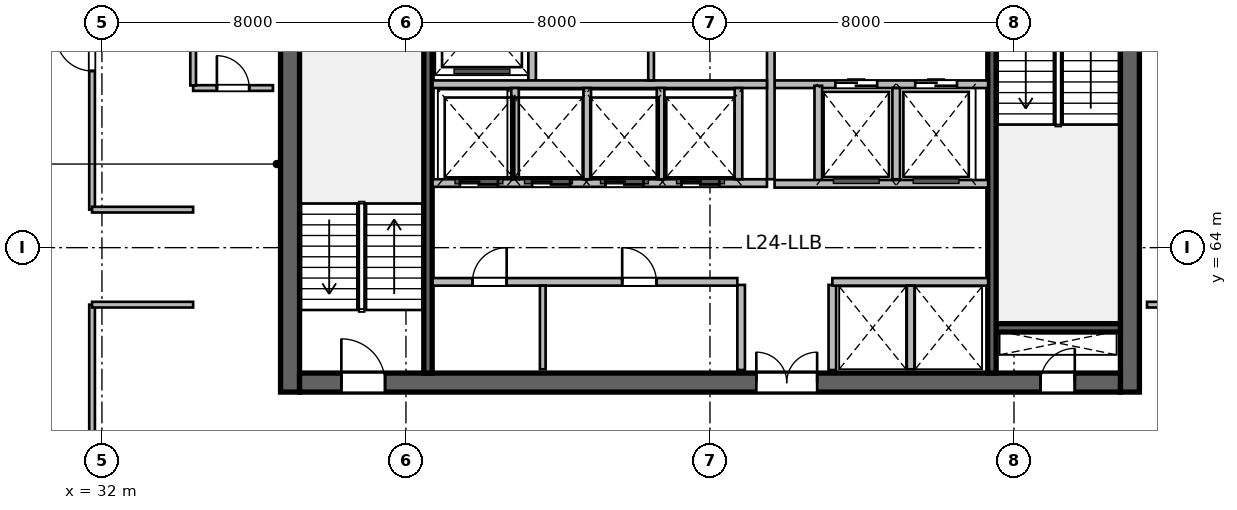
"""IFC4 building model, lengths in metres.
Left out: names, types, materials, properties, quantities, classifications, styles, units other than length and angle.
Written with IfcOpenShell. Run it as: python <this file> out.ifc"""

import sys

from ifc_helpers import new_model, si_unit, direction, frame, frame_2d, origin, place, context, subcontext, project, spatial, rectangle, extrude, source, transform, mapped, element, fill, save


model = new_model("IFC4")
c1 = context("Model", 3, precision=1e-05, world=origin(), true_north=direction((0.0, 1.0)))
c2 = subcontext(c1, "Body", "Model", "MODEL_VIEW")
j1 = project(units=[si_unit("LENGTHUNIT", "METRE"), si_unit("PLANEANGLEUNIT", "RADIAN")], contexts=[c1])
p1 = place(None, origin())
s1 = spatial("IfcSite", under=j1, at=p1, CompositionType="ELEMENT")
p2 = place(p1, origin())
s2 = spatial("IfcBuilding", under=s1, at=p2, CompositionType="ELEMENT")
p3 = place(p2, frame((0.0, 0.0, 103.8)))
s3 = spatial("IfcBuildingStorey", under=s2, at=p3, CompositionType="ELEMENT", Elevation=103.8)
m1 = source(origin(), c2, "Body", "SweptSolid", [
    extrude(rectangle(XDim=12.0, YDim=0.5, at=frame_2d((6.0, 0.0))), origin(), (0.0, 0.0, 1.0), 3.9),
])
for number, where, z_axis, x_axis in (
    (1, (36.95, 60.2, 0.0), (0.0, 0.0, 1.0), (0.0, 1.0, 0.0)),
    (2, (59.05, 60.2, 0.0), (0.0, 0.0, 1.0), (0.0, 1.0, 0.0)),
):
    element("IfcWall", number, at=place(p3, frame(where, z_axis=z_axis, x_axis=x_axis)), inside=s3, PredefinedType="SHEAR", context=c2, shape_type="MappedRepresentation", body=[
        mapped(m1, transform((0.0, 0.0, 0.0), scale=1.0)),
    ])
m2 = source(origin(), c2, "Body", "SweptSolid", [
    extrude(rectangle(XDim=21.6, YDim=0.5, at=frame_2d((10.8, 0.0))), origin(), (0.0, 0.0, 1.0), 3.9),
])
p4 = place(p3, frame((37.2, 60.45, 0.0), z_axis=(0.0, 0.0, 1.0), x_axis=(1.0, 0.0, 0.0)))
e3 = element("IfcWall", 3, at=p4, inside=s3, PredefinedType="SHEAR", context=c2, shape_type="MappedRepresentation", body=[
    mapped(m2, transform((0.0, 0.0, 0.0), scale=1.0)),
])
p5 = place(p4, frame((1.1, 0.0, 0.0)))
e4 = element("IfcOpeningElement", 4, at=p5, cuts=e3, PredefinedType="OPENING", context=c2, shape_type="SweptSolid", body=[
    extrude(rectangle(XDim=1.15, YDim=2.15, at=frame_2d((0.575, 1.075))), frame((0.0, 0.26, 0.0), z_axis=(0.0, -1.0, 0.0), x_axis=(1.0, 0.0, 0.0)), (0.0, 0.0, 1.0), 0.52),
])
p6 = place(p4, frame((19.5, 0.0, 0.0)))
e5 = element("IfcOpeningElement", 5, at=p6, cuts=e3, PredefinedType="OPENING", context=c2, shape_type="SweptSolid", body=[
    extrude(rectangle(XDim=0.9, YDim=2.1, at=frame_2d((0.45, 1.05))), frame((0.0, 0.26, 0.0), z_axis=(0.0, -1.0, 0.0), x_axis=(1.0, 0.0, 0.0)), (0.0, 0.0, 1.0), 0.52),
])
p7 = place(p4, frame((12.02, 0.0, 0.0)))
e6 = element("IfcOpeningElement", 6, at=p7, cuts=e3, PredefinedType="OPENING", context=c2, shape_type="SweptSolid", body=[
    extrude(rectangle(XDim=1.6, YDim=2.15, at=frame_2d((0.8, 1.075))), frame((0.0, 0.26, 0.0), z_axis=(0.0, -1.0, 0.0), x_axis=(1.0, 0.0, 0.0)), (0.0, 0.0, 1.0), 0.52),
])
m3 = source(origin(), c2, "Body", "SweptSolid", [
    extrude(rectangle(XDim=3.27, YDim=0.22, at=frame_2d((1.635, 0.0))), origin(), (0.0, 0.0, 1.0), 3.9),
])
p8 = place(p3, frame((55.53, 61.89, 0.0), z_axis=(0.0, 0.0, 1.0), x_axis=(1.0, 0.0, 0.0)))
e7 = element("IfcWall", 7, at=p8, inside=s3, PredefinedType="SHEAR", context=c2, shape_type="MappedRepresentation", body=[
    mapped(m3, transform((0.0, 0.0, 0.0), scale=1.0)),
])
m4 = source(origin(), c2, "Body", "SweptSolid", [
    extrude(rectangle(XDim=11.0, YDim=0.22, at=frame_2d((5.5, 0.0))), origin(), (0.0, 0.0, 1.0), 3.9),
])
p9 = place(p3, frame((40.58, 60.7, 0.0), z_axis=(0.0, 0.0, 1.0), x_axis=(0.0, 1.0, 0.0)))
e8 = element("IfcWall", 8, at=p9, inside=s3, PredefinedType="SHEAR", context=c2, shape_type="MappedRepresentation", body=[
    mapped(m4, transform((0.0, 0.0, 0.0), scale=1.0)),
])
p10 = place(p3, frame((55.42, 60.7, 0.0), z_axis=(0.0, 0.0, 1.0), x_axis=(0.0, 1.0, 0.0)))
e9 = element("IfcWall", 9, at=p10, inside=s3, PredefinedType="SHEAR", context=c2, shape_type="MappedRepresentation", body=[
    mapped(m4, transform((0.0, 0.0, 0.0), scale=1.0)),
])
p11 = place(p10, frame((9.545, 0.0, 0.0)))
e10 = element("IfcOpeningElement", 10, at=p11, cuts=e9, PredefinedType="OPENING", context=c2, shape_type="SweptSolid", body=[
    extrude(rectangle(XDim=1.15, YDim=2.15, at=frame_2d((0.575, 1.075))), frame((0.0, 0.12, 0.0), z_axis=(0.0, -1.0, 0.0), x_axis=(1.0, 0.0, 0.0)), (0.0, 0.0, 1.0), 0.24),
])
m5 = source(origin(), c2, "Body", "SweptSolid", [
    extrude(rectangle(XDim=2.24, YDim=0.2, at=frame_2d((1.12, 0.0))), origin(), (0.0, 0.0, 1.0), 3.65),
])
for number, where, z_axis, x_axis in (
    (11, (48.82, 60.78, 0.0), (0.0, 0.0, 1.0), (0.0, 1.0, 0.0)),
    (12, (51.22, 60.78, 0.0), (0.0, 0.0, 1.0), (0.0, 1.0, 0.0)),
):
    element("IfcWall", number, at=place(p3, frame(where, z_axis=z_axis, x_axis=x_axis)), inside=s3, PredefinedType="SOLIDWALL", context=c2, shape_type="MappedRepresentation", body=[
        mapped(m5, transform((0.0, 0.0, 0.0), scale=1.0)),
    ])
m6 = source(origin(), c2, "Body", "SweptSolid", [
    extrude(rectangle(XDim=5.62, YDim=0.2, at=frame_2d((2.81, 0.0))), origin(), (0.0, 0.0, 1.0), 3.65),
])
p12 = place(p3, frame((49.7, 68.3, 0.0), z_axis=(0.0, 0.0, 1.0), x_axis=(1.0, 0.0, 0.0)))
e13 = element("IfcWall", 13, at=p12, inside=s3, PredefinedType="SOLIDWALL", context=c2, shape_type="MappedRepresentation", body=[
    mapped(m6, transform((0.0, 0.0, 0.0), scale=1.0)),
])
p13 = place(p12, frame((1.6, 0.0, 0.0)))
e14 = element("IfcOpeningElement", 14, at=p13, cuts=e13, PredefinedType="OPENING", context=c2, shape_type="SweptSolid", body=[
    extrude(rectangle(XDim=1.1, YDim=2.15, at=frame_2d((0.55, 1.075))), frame((0.0, 0.11, 0.0), z_axis=(0.0, -1.0, 0.0), x_axis=(1.0, 0.0, 0.0)), (0.0, 0.0, 1.0), 0.22),
])
p14 = place(p12, frame((3.7, 0.0, 0.0)))
e15 = element("IfcOpeningElement", 15, at=p14, cuts=e13, PredefinedType="OPENING", context=c2, shape_type="SweptSolid", body=[
    extrude(rectangle(XDim=1.1, YDim=2.15, at=frame_2d((0.55, 1.075))), frame((0.0, 0.11, 0.0), z_axis=(0.0, -1.0, 0.0), x_axis=(1.0, 0.0, 0.0)), (0.0, 0.0, 1.0), 0.22),
])
m7 = source(origin(), c2, "Body", "SweptSolid", [
    extrude(rectangle(XDim=5.8, YDim=0.2, at=frame_2d((2.9, 0.0))), origin(), (0.0, 0.0, 1.0), 3.65),
])
p15 = place(p3, frame((49.6, 65.8, 0.0), z_axis=(0.0, 0.0, 1.0), x_axis=(0.0, 1.0, 0.0)))
e16 = element("IfcWall", 16, at=p15, inside=s3, PredefinedType="SOLIDWALL", context=c2, shape_type="MappedRepresentation", body=[
    mapped(m7, transform((0.0, 0.0, 0.0), scale=1.0)),
])
m8 = source(origin(), c2, "Body", "SweptSolid", [
    extrude(rectangle(XDim=2.58, YDim=0.2, at=frame_2d((1.29, 0.0))), origin(), (0.0, 0.0, 1.0), 3.65),
])
p16 = place(p3, frame((50.85, 65.68, 0.0), z_axis=(0.0, 0.0, 1.0), x_axis=(0.0, 1.0, 0.0)))
e17 = element("IfcWall", 17, at=p16, inside=s3, PredefinedType="SOLIDWALL", context=c2, shape_type="MappedRepresentation", body=[
    mapped(m8, transform((0.0, 0.0, 0.0), scale=1.0)),
])
m9 = source(origin(), c2, "Body", "SweptSolid", [
    extrude(rectangle(XDim=2.4, YDim=0.2, at=frame_2d((1.2, 0.0))), origin(), (0.0, 0.0, 1.0), 3.65),
])
p17 = place(p3, frame((52.9, 65.8, 0.0), z_axis=(0.0, 0.0, 1.0), x_axis=(0.0, 1.0, 0.0)))
e18 = element("IfcWall", 18, at=p17, inside=s3, PredefinedType="SOLIDWALL", context=c2, shape_type="MappedRepresentation", body=[
    mapped(m9, transform((0.0, 0.0, 0.0), scale=1.0)),
])
p18 = place(p3, frame((49.7, 65.68, 0.0), z_axis=(0.0, 0.0, 1.0), x_axis=(1.0, 0.0, 0.0)))
e19 = element("IfcWall", 19, at=p18, inside=s3, PredefinedType="SOLIDWALL", context=c2, shape_type="MappedRepresentation", body=[
    mapped(m6, transform((0.0, 0.0, 0.0), scale=1.0)),
])
m10 = source(origin(), c2, "Body", "SweptSolid", [
    extrude(rectangle(XDim=3.2, YDim=0.2, at=frame_2d((1.6, 0.0))), origin(), (0.0, 0.0, 1.0), 3.65),
])
p19 = place(p3, frame((43.32, 68.4, 0.0), z_axis=(0.0, 0.0, 1.0), x_axis=(0.0, 1.0, 0.0)))
e20 = element("IfcWall", 20, at=p19, inside=s3, PredefinedType="SOLIDWALL", context=c2, shape_type="MappedRepresentation", body=[
    mapped(m10, transform((0.0, 0.0, 0.0), scale=1.0)),
])
m11 = source(origin(), c2, "Body", "SweptSolid", [
    extrude(rectangle(XDim=8.8, YDim=0.2, at=frame_2d((4.4, 0.0))), origin(), (0.0, 0.0, 1.0), 3.65),
])
p20 = place(p3, frame((40.7, 68.3, 0.0), z_axis=(0.0, 0.0, 1.0), x_axis=(1.0, 0.0, 0.0)))
e21 = element("IfcWall", 21, at=p20, inside=s3, PredefinedType="SOLIDWALL", context=c2, shape_type="MappedRepresentation", body=[
    mapped(m11, transform((0.0, 0.0, 0.0), scale=1.0)),
])
m12 = source(origin(), c2, "Body", "SweptSolid", [
    extrude(rectangle(XDim=3.28, YDim=0.15, at=frame_2d((1.64, 0.0))), origin(), (0.0, 0.0, 1.0), 3.65),
])
p21 = place(p3, frame((46.45, 68.4, 0.0), z_axis=(0.0, 0.0, 1.0), x_axis=(0.0, 1.0, 0.0)))
e22 = element("IfcWall", 22, at=p21, inside=s3, PredefinedType="PARTITIONING", context=c2, shape_type="MappedRepresentation", body=[
    mapped(m12, transform((0.0, 0.0, 0.0), scale=1.0)),
])
m13 = source(origin(), c2, "Body", "SweptSolid", [
    extrude(rectangle(XDim=8.02, YDim=0.2, at=frame_2d((4.01, 0.0))), origin(), (0.0, 0.0, 1.0), 3.65),
])
p22 = place(p3, frame((40.7, 63.1, 0.0), z_axis=(0.0, 0.0, 1.0), x_axis=(1.0, 0.0, 0.0)))
e23 = element("IfcWall", 23, at=p22, inside=s3, PredefinedType="SOLIDWALL", context=c2, shape_type="MappedRepresentation", body=[
    mapped(m13, transform((0.0, 0.0, 0.0), scale=1.0)),
])
p23 = place(p22, frame((1.05, 0.0, 0.0)))
e24 = element("IfcOpeningElement", 24, at=p23, cuts=e23, PredefinedType="OPENING", context=c2, shape_type="SweptSolid", body=[
    extrude(rectangle(XDim=0.9, YDim=2.1, at=frame_2d((0.45, 1.05))), frame((0.0, 0.11, 0.0), z_axis=(0.0, -1.0, 0.0), x_axis=(1.0, 0.0, 0.0)), (0.0, 0.0, 1.0), 0.22),
])
p24 = place(p22, frame((4.99, 0.0, 0.0)))
e25 = element("IfcOpeningElement", 25, at=p24, cuts=e23, PredefinedType="OPENING", context=c2, shape_type="SweptSolid", body=[
    extrude(rectangle(XDim=0.9, YDim=2.1, at=frame_2d((0.45, 1.05))), frame((0.0, 0.11, 0.0), z_axis=(0.0, -1.0, 0.0), x_axis=(1.0, 0.0, 0.0)), (0.0, 0.0, 1.0), 0.22),
])
m14 = source(origin(), c2, "Body", "SweptSolid", [
    extrude(rectangle(XDim=4.1, YDim=0.2, at=frame_2d((2.05, 0.0))), origin(), (0.0, 0.0, 1.0), 3.65),
])
p25 = place(p3, frame((51.22, 63.1, 0.0), z_axis=(0.0, 0.0, 1.0), x_axis=(1.0, 0.0, 0.0)))
e26 = element("IfcWall", 26, at=p25, inside=s3, PredefinedType="SOLIDWALL", context=c2, shape_type="MappedRepresentation", body=[
    mapped(m14, transform((0.0, 0.0, 0.0), scale=1.0)),
])
m15 = source(origin(), c2, "Body", "SweptSolid", [
    extrude(rectangle(XDim=2.2, YDim=0.15, at=frame_2d((1.1, 0.0))), origin(), (0.0, 0.0, 1.0), 3.65),
])
p26 = place(p3, frame((43.6, 60.8, 0.0), z_axis=(0.0, 0.0, 1.0), x_axis=(0.0, 1.0, 0.0)))
e27 = element("IfcWall", 27, at=p26, inside=s3, PredefinedType="PARTITIONING", context=c2, shape_type="MappedRepresentation", body=[
    mapped(m15, transform((0.0, 0.0, 0.0), scale=1.0)),
])
m16 = source(origin(), c2, "Body", "SweptSolid", [
    extrude(rectangle(XDim=2.2, YDim=0.2, at=frame_2d((1.1, 0.0))), origin(), (0.0, 0.0, 1.0), 3.65),
])
p27 = place(p3, frame((53.28, 60.8, 0.0), z_axis=(0.0, 0.0, 1.0), x_axis=(0.0, 1.0, 0.0)))
e28 = element("IfcWall", 28, at=p27, inside=s3, PredefinedType="SOLIDWALL", context=c2, shape_type="MappedRepresentation", body=[
    mapped(m16, transform((0.0, 0.0, 0.0), scale=1.0)),
])
p28 = place(p3, frame((40.7, 65.7, 0.0), z_axis=(0.0, 0.0, 1.0), x_axis=(1.0, 0.0, 0.0)))
e29 = element("IfcWall", 29, at=p28, inside=s3, PredefinedType="SOLIDWALL", context=c2, shape_type="MappedRepresentation", body=[
    mapped(m11, transform((0.0, 0.0, 0.0), scale=1.0)),
])
p29 = place(p28, frame((0.72, 0.0, 0.0)))
e30 = element("IfcOpeningElement", 30, at=p29, cuts=e29, PredefinedType="OPENING", context=c2, shape_type="SweptSolid", body=[
    extrude(rectangle(XDim=1.0, YDim=2.15, at=frame_2d((0.5, 1.075))), frame((0.0, 0.11, 0.0), z_axis=(0.0, -1.0, 0.0), x_axis=(1.0, 0.0, 0.0)), (0.0, 0.0, 1.0), 0.22),
])
p30 = place(p28, frame((2.62, 0.0, 0.0)))
e31 = element("IfcOpeningElement", 31, at=p30, cuts=e29, PredefinedType="OPENING", context=c2, shape_type="SweptSolid", body=[
    extrude(rectangle(XDim=1.0, YDim=2.15, at=frame_2d((0.5, 1.075))), frame((0.0, 0.11, 0.0), z_axis=(0.0, -1.0, 0.0), x_axis=(1.0, 0.0, 0.0)), (0.0, 0.0, 1.0), 0.22),
])
p31 = place(p28, frame((4.55, 0.0, 0.0)))
e32 = element("IfcOpeningElement", 32, at=p31, cuts=e29, PredefinedType="OPENING", context=c2, shape_type="SweptSolid", body=[
    extrude(rectangle(XDim=1.0, YDim=2.15, at=frame_2d((0.5, 1.075))), frame((0.0, 0.11, 0.0), z_axis=(0.0, -1.0, 0.0), x_axis=(1.0, 0.0, 0.0)), (0.0, 0.0, 1.0), 0.22),
])
p32 = place(p28, frame((6.55, 0.0, 0.0)))
e33 = element("IfcOpeningElement", 33, at=p32, cuts=e29, PredefinedType="OPENING", context=c2, shape_type="SweptSolid", body=[
    extrude(rectangle(XDim=1.0, YDim=2.15, at=frame_2d((0.5, 1.075))), frame((0.0, 0.11, 0.0), z_axis=(0.0, -1.0, 0.0), x_axis=(1.0, 0.0, 0.0)), (0.0, 0.0, 1.0), 0.22),
])
for number, where, z_axis, x_axis in (
    (34, (48.75, 65.8, 0.0), (0.0, 0.0, 1.0), (0.0, 1.0, 0.0)),
    (35, (42.87, 65.8, 0.0), (0.0, 0.0, 1.0), (0.0, 1.0, 0.0)),
    (36, (44.77, 65.8, 0.0), (0.0, 0.0, 1.0), (0.0, 1.0, 0.0)),
    (37, (46.7, 65.8, 0.0), (0.0, 0.0, 1.0), (0.0, 1.0, 0.0)),
):
    element("IfcWall", number, at=place(p3, frame(where, z_axis=z_axis, x_axis=x_axis)), inside=s3, PredefinedType="SOLIDWALL", context=c2, shape_type="MappedRepresentation", body=[
        mapped(m9, transform((0.0, 0.0, 0.0), scale=1.0)),
    ])
m17 = source(origin(), c2, "Body", "SweptSolid", [
    extrude(rectangle(XDim=2.1, YDim=0.15, at=frame_2d((1.05, 0.0))), origin(), (0.0, 0.0, 1.0), 3.65),
])
p33 = place(p3, frame((34.4, 68.2, 0.0), z_axis=(0.0, 0.0, 1.0), x_axis=(1.0, 0.0, 0.0)))
e38 = element("IfcWall", 38, at=p33, inside=s3, PredefinedType="PARTITIONING", context=c2, shape_type="MappedRepresentation", body=[
    mapped(m17, transform((0.0, 0.0, 0.0), scale=1.0)),
])
p34 = place(p33, frame((0.625, 0.0, 0.0)))
e39 = element("IfcOpeningElement", 39, at=p34, cuts=e38, PredefinedType="OPENING", context=c2, shape_type="SweptSolid", body=[
    extrude(rectangle(XDim=0.85, YDim=2.1, at=frame_2d((0.425, 1.05))), frame((0.0, 0.085, 0.0), z_axis=(0.0, -1.0, 0.0), x_axis=(1.0, 0.0, 0.0)), (0.0, 0.0, 1.0), 0.17),
])
m18 = source(origin(), c2, "Body", "SweptSolid", [
    extrude(rectangle(XDim=3.845, YDim=0.15, at=frame_2d((1.922, 0.0))), origin(), (0.0, 0.0, 1.0), 3.65),
])
p35 = place(p3, frame((34.4, 68.268, 0.0), z_axis=(0.0, 0.0, 1.0), x_axis=(0.0, 1.0, 0.0)))
e40 = element("IfcWall", 40, at=p35, inside=s3, PredefinedType="PARTITIONING", context=c2, shape_type="MappedRepresentation", body=[
    mapped(m18, transform((0.0, 0.0, 0.0), scale=1.0)),
])
m19 = source(origin(), c2, "Body", "SweptSolid", [
    extrude(rectangle(XDim=17.974, YDim=0.15, at=frame_2d((8.987, 0.0))), origin(), (0.0, 0.0, 1.0), 2.942),
])
p36 = place(p3, frame((31.74, 44.526, 0.0), z_axis=(0.0, 0.0, 1.0), x_axis=(0.0, 1.0, 0.0)))
e41 = element("IfcWall", 41, at=p36, inside=s3, PredefinedType="PARTITIONING", context=c2, shape_type="MappedRepresentation", body=[
    mapped(m19, transform((0.0, 0.0, 0.0), scale=1.0)),
])
p37 = place(p36, frame((8.512, 0.0, 0.0)))
e42 = element("IfcOpeningElement", 42, at=p37, cuts=e41, PredefinedType="OPENING", context=c2, shape_type="SweptSolid", body=[
    extrude(rectangle(XDim=0.95, YDim=2.1, at=frame_2d((0.475, 1.05))), frame((0.0, 0.085, 0.0), z_axis=(0.0, -1.0, 0.0), x_axis=(1.0, 0.0, 0.0)), (0.0, 0.0, 1.0), 0.17),
])
m20 = source(origin(), c2, "Body", "SweptSolid", [
    extrude(rectangle(XDim=2.66, YDim=0.15, at=frame_2d((1.33, 0.0))), origin(), (0.0, 0.0, 1.0), 3.65),
])
p38 = place(p3, frame((31.74, 62.5, 0.0), z_axis=(0.0, 0.0, 1.0), x_axis=(1.0, 0.0, 0.0)))
e43 = element("IfcWall", 43, at=p38, inside=s3, PredefinedType="PARTITIONING", context=c2, shape_type="MappedRepresentation", body=[
    mapped(m20, transform((0.0, 0.0, 0.0), scale=1.0)),
])
m21 = source(origin(), c2, "Body", "SweptSolid", [
    extrude(rectangle(XDim=9.729, YDim=0.15, at=frame_2d((4.864, 0.0))), origin(), (0.0, 0.0, 1.0), 3.65),
])
p39 = place(p3, frame((31.74, 65.0, 0.0), z_axis=(0.0, 0.0, 1.0), x_axis=(0.0, 1.0, 0.0)))
e44 = element("IfcWall", 44, at=p39, inside=s3, PredefinedType="PARTITIONING", context=c2, shape_type="MappedRepresentation", body=[
    mapped(m21, transform((0.0, 0.0, 0.0), scale=1.0)),
])
p40 = place(p39, frame((3.65, 0.0, 0.0)))
e45 = element("IfcOpeningElement", 45, at=p40, cuts=e44, PredefinedType="OPENING", context=c2, shape_type="SweptSolid", body=[
    extrude(rectangle(XDim=0.95, YDim=2.1, at=frame_2d((0.475, 1.05))), frame((0.0, 0.085, 0.0), z_axis=(0.0, -1.0, 0.0), x_axis=(1.0, 0.0, 0.0)), (0.0, 0.0, 1.0), 0.17),
])
p41 = place(p3, frame((31.74, 65.0, 0.0), z_axis=(0.0, 0.0, 1.0), x_axis=(1.0, 0.0, 0.0)))
e46 = element("IfcWall", 46, at=p41, inside=s3, PredefinedType="PARTITIONING", context=c2, shape_type="MappedRepresentation", body=[
    mapped(m20, transform((0.0, 0.0, 0.0), scale=1.0)),
])
m22 = source(origin(), c2, "Body", "SweptSolid", [
    extrude(rectangle(XDim=4.76, YDim=0.15, at=frame_2d((2.38, 0.0))), origin(), (0.0, 0.0, 1.0), 3.65),
])
p42 = place(p3, frame((59.5, 62.5, 0.0), z_axis=(0.0, 0.0, 1.0), x_axis=(1.0, 0.0, 0.0)))
e47 = element("IfcWall", 47, at=p42, inside=s3, PredefinedType="PARTITIONING", context=c2, shape_type="MappedRepresentation", body=[
    mapped(m22, transform((0.0, 0.0, 0.0), scale=1.0)),
])
m23 = source(origin(), c2, "Body", "SweptSolid", [
    extrude(rectangle(XDim=1.15, YDim=2.15, at=frame_2d((0.575, 1.075))), frame((0.0, 0.025, 0.0), z_axis=(0.0, -1.0, 0.0), x_axis=(1.0, 0.0, 0.0)), (0.0, 0.0, 1.0), 0.05),
])
p43 = place(p5, origin())
e48 = element("IfcDoor", 48, at=p43, inside=s3, OperationType="SINGLE_SWING_LEFT", PredefinedType="DOOR", context=c2, shape_type="MappedRepresentation", body=[
    mapped(m23, transform((0.0, 0.0, 0.0), scale=1.0)),
])
fill(e4, e48)
m24 = source(origin(), c2, "Body", "SweptSolid", [
    extrude(rectangle(XDim=0.9, YDim=2.1, at=frame_2d((0.45, 1.05))), frame((0.0, 0.025, 0.0), z_axis=(0.0, -1.0, 0.0), x_axis=(1.0, 0.0, 0.0)), (0.0, 0.0, 1.0), 0.05),
])
p44 = place(p6, origin())
e49 = element("IfcDoor", 49, at=p44, inside=s3, OperationType="SINGLE_SWING_RIGHT", PredefinedType="DOOR", context=c2, shape_type="MappedRepresentation", body=[
    mapped(m24, transform((0.0, 0.0, 0.0), scale=1.0)),
])
fill(e5, e49)
m25 = source(origin(), c2, "Body", "SweptSolid", [
    extrude(rectangle(XDim=1.6, YDim=2.15, at=frame_2d((0.8, 1.075))), frame((0.0, 0.025, 0.0), z_axis=(0.0, -1.0, 0.0), x_axis=(1.0, 0.0, 0.0)), (0.0, 0.0, 1.0), 0.05),
])
p45 = place(p7, origin())
e50 = element("IfcDoor", 50, at=p45, inside=s3, OperationType="DOUBLE_DOOR_SINGLE_SWING", PredefinedType="DOOR", context=c2, shape_type="MappedRepresentation", body=[
    mapped(m25, transform((0.0, 0.0, 0.0), scale=1.0)),
])
fill(e6, e50)
m26 = source(origin(), c2, "Body", "SweptSolid", [
    extrude(rectangle(XDim=1.1, YDim=2.15, at=frame_2d((0.55, 1.075))), frame((0.0, 0.025, 0.0), z_axis=(0.0, -1.0, 0.0), x_axis=(1.0, 0.0, 0.0)), (0.0, 0.0, 1.0), 0.05),
])
p46 = place(p13, origin())
e51 = element("IfcDoor", 51, at=p46, inside=s3, OperationType="DOUBLE_DOOR_SLIDING", PredefinedType="DOOR", context=c2, shape_type="MappedRepresentation", body=[
    mapped(m26, transform((0.0, 0.0, 0.0), scale=1.0)),
])
fill(e14, e51)
p47 = place(p14, origin())
e52 = element("IfcDoor", 52, at=p47, inside=s3, OperationType="DOUBLE_DOOR_SLIDING", PredefinedType="DOOR", context=c2, shape_type="MappedRepresentation", body=[
    mapped(m26, transform((0.0, 0.0, 0.0), scale=1.0)),
])
fill(e15, e52)
p48 = place(p23, origin())
e53 = element("IfcDoor", 53, at=p48, inside=s3, OperationType="SINGLE_SWING_RIGHT", PredefinedType="DOOR", context=c2, shape_type="MappedRepresentation", body=[
    mapped(m24, transform((0.0, 0.0, 0.0), scale=1.0)),
])
fill(e24, e53)
p49 = place(p24, origin())
e54 = element("IfcDoor", 54, at=p49, inside=s3, OperationType="SINGLE_SWING_LEFT", PredefinedType="DOOR", context=c2, shape_type="MappedRepresentation", body=[
    mapped(m24, transform((0.0, 0.0, 0.0), scale=1.0)),
])
fill(e25, e54)
m27 = source(origin(), c2, "Body", "SweptSolid", [
    extrude(rectangle(XDim=1.0, YDim=2.15, at=frame_2d((0.5, 1.075))), frame((0.0, 0.025, 0.0), z_axis=(0.0, -1.0, 0.0), x_axis=(1.0, 0.0, 0.0)), (0.0, 0.0, 1.0), 0.05),
])
p50 = place(p29, origin())
e55 = element("IfcDoor", 55, at=p50, inside=s3, OperationType="DOUBLE_DOOR_SLIDING", PredefinedType="DOOR", context=c2, shape_type="MappedRepresentation", body=[
    mapped(m27, transform((0.0, 0.0, 0.0), scale=1.0)),
])
fill(e30, e55)
p51 = place(p30, origin())
e56 = element("IfcDoor", 56, at=p51, inside=s3, OperationType="DOUBLE_DOOR_SLIDING", PredefinedType="DOOR", context=c2, shape_type="MappedRepresentation", body=[
    mapped(m27, transform((0.0, 0.0, 0.0), scale=1.0)),
])
fill(e31, e56)
p52 = place(p31, origin())
e57 = element("IfcDoor", 57, at=p52, inside=s3, OperationType="DOUBLE_DOOR_SLIDING", PredefinedType="DOOR", context=c2, shape_type="MappedRepresentation", body=[
    mapped(m27, transform((0.0, 0.0, 0.0), scale=1.0)),
])
fill(e32, e57)
p53 = place(p32, origin())
e58 = element("IfcDoor", 58, at=p53, inside=s3, OperationType="DOUBLE_DOOR_SLIDING", PredefinedType="DOOR", context=c2, shape_type="MappedRepresentation", body=[
    mapped(m27, transform((0.0, 0.0, 0.0), scale=1.0)),
])
fill(e33, e58)
m28 = source(origin(), c2, "Body", "SweptSolid", [
    extrude(rectangle(XDim=0.85, YDim=2.1, at=frame_2d((0.425, 1.05))), frame((0.0, 0.025, 0.0), z_axis=(0.0, -1.0, 0.0), x_axis=(1.0, 0.0, 0.0)), (0.0, 0.0, 1.0), 0.05),
])
p54 = place(p34, origin())
e59 = element("IfcDoor", 59, at=p54, inside=s3, OperationType="SINGLE_SWING_LEFT", PredefinedType="DOOR", context=c2, shape_type="MappedRepresentation", body=[
    mapped(m28, transform((0.0, 0.0, 0.0), scale=1.0)),
])
fill(e39, e59)
m29 = source(origin(), c2, "Body", "SweptSolid", [
    extrude(rectangle(XDim=0.95, YDim=2.1, at=frame_2d((0.475, 1.05))), frame((0.0, 0.025, 0.0), z_axis=(0.0, -1.0, 0.0), x_axis=(1.0, 0.0, 0.0)), (0.0, 0.0, 1.0), 0.05),
])
p55 = place(p40, origin())
e60 = element("IfcDoor", 60, at=p55, inside=s3, OperationType="SINGLE_SWING_RIGHT", PredefinedType="DOOR", context=c2, shape_type="MappedRepresentation", body=[
    mapped(m29, transform((0.0, 0.0, 0.0), scale=1.0)),
])
fill(e45, e60)
save(model, sys.argv[1])
